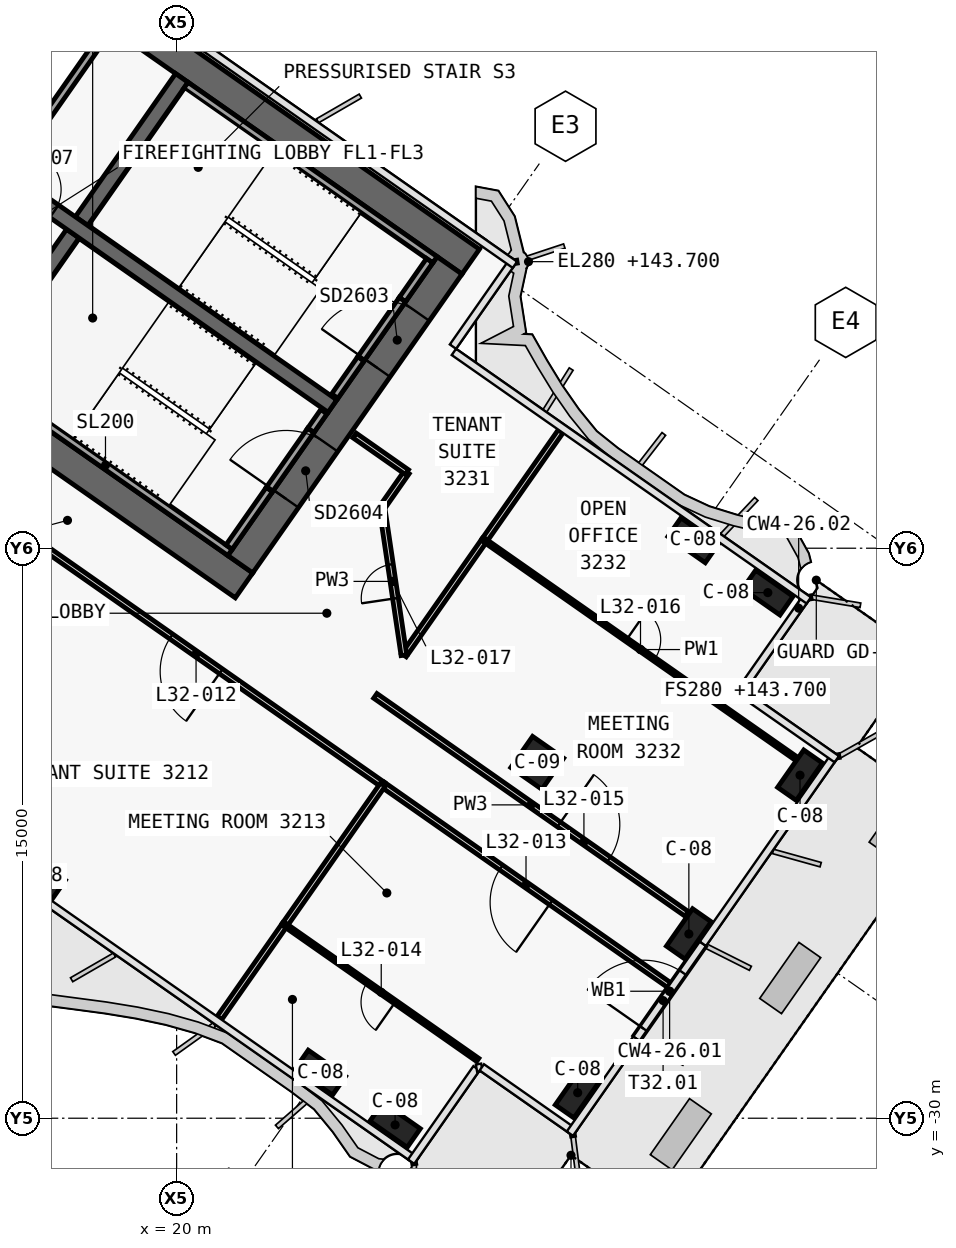
"""IFC4 building model, lengths in metres.
Left out: names, types, materials, properties, quantities, classifications, styles, units other than length and angle.
Written with IfcOpenShell. Run it as: python <this file> out.ifc"""

import sys

from ifc_helpers import new_model, si_unit, direction, frame, frame_2d, origin, origin_2d, place, context, subcontext, project, spatial, polyline, rectangle, outline, extrude, element, fill, save


model = new_model("IFC4")
c1 = context("Model", 3, precision=1e-05, world=origin(), true_north=direction((0.0, 1.0)))
c2 = subcontext(c1, "Body", "Model", "MODEL_VIEW")
j1 = project(units=[si_unit("LENGTHUNIT", "METRE"), si_unit("PLANEANGLEUNIT", "RADIAN")], contexts=[c1])
p1 = place(None, origin())
s1 = spatial("IfcSite", under=j1, at=p1, CompositionType="ELEMENT")
p2 = place(p1, origin())
s2 = spatial("IfcBuilding", under=s1, at=p2, CompositionType="ELEMENT")
p3 = place(p2, frame((0.0, 0.0, 143.7)))
s3 = spatial("IfcBuildingStorey", under=s2, at=p3, CompositionType="ELEMENT", Elevation=143.7)
p4 = place(p3, frame((-0.029, 11.984, 0.0), z_axis=(0.0, 0.0, 1.0), x_axis=(0.819151382952, -0.573577380837, 0.0)))
e1 = element("IfcWall", 1, at=p4, inside=s3, PredefinedType="SHEAR", context=c2, shape_type="SweptSolid", body=[
    extrude(outline(polyline([(33.898, 0.4), (-0.0, 0.4), (0.56, -0.4), (33.898, -0.4), (33.898, 0.4)])), origin(), (0.0, 0.0, 1.0), 3.9),
])
p5 = place(p3, frame((-0.029, -0.712, 0.0), z_axis=(0.0, 0.0, 1.0), x_axis=(0.819151758019, -0.573576845187, 0.0)))
e2 = element("IfcWall", 2, at=p5, inside=s3, PredefinedType="SHEAR", context=c2, shape_type="SweptSolid", body=[
    extrude(outline(polyline([(26.616, 0.4), (-0.0, 0.4), (0.56, -0.4), (26.616, -0.4), (26.616, 0.4)])), origin(), (0.0, 0.0, 1.0), 3.9),
])
p6 = place(p5, frame((6.666, 0.0, 0.0)))
e3 = element("IfcOpeningElement", 3, at=p6, cuts=e2, PredefinedType="OPENING", context=c2, shape_type="SweptSolid", body=[
    extrude(rectangle(XDim=1.5, YDim=2.1, at=frame_2d((0.75, 1.05))), frame((0.0, 0.41, 0.0), z_axis=(0.0, -1.0, 0.0), x_axis=(1.0, 0.0, 0.0)), (0.0, 0.0, 1.0), 0.82),
])
p7 = place(p5, frame((12.366, 0.0, 0.0)))
e4 = element("IfcOpeningElement", 4, at=p7, cuts=e2, PredefinedType="OPENING", context=c2, shape_type="SweptSolid", body=[
    extrude(rectangle(XDim=1.5, YDim=2.1, at=frame_2d((0.75, 1.05))), frame((0.0, 0.41, 0.0), z_axis=(0.0, -1.0, 0.0), x_axis=(1.0, 0.0, 0.0)), (0.0, 0.0, 1.0), 0.82),
])
p8 = place(p3, frame((21.675, -15.421, 0.0), z_axis=(0.0, 0.0, 1.0), x_axis=(0.573581815061, 0.819148278049, 0.0)))
e5 = element("IfcWall", 5, at=p8, inside=s3, PredefinedType="SHEAR", context=c2, shape_type="SweptSolid", body=[
    extrude(outline(polyline([(9.6, 0.4), (0.0, 0.4), (0.0, -0.4), (9.6, -0.4), (9.6, 0.4)])), origin(), (0.0, 0.0, 1.0), 3.9),
])
p9 = place(p8, frame((6.3, 0.0, 0.0)))
e6 = element("IfcOpeningElement", 6, at=p9, cuts=e5, PredefinedType="OPENING", context=c2, shape_type="SweptSolid", body=[
    extrude(rectangle(XDim=1.8, YDim=2.1, at=frame_2d((0.9, 1.05))), frame((0.0, 0.41, 0.0), z_axis=(0.0, -1.0, 0.0), x_axis=(1.0, 0.0, 0.0)), (0.0, 0.0, 1.0), 0.82),
])
p10 = place(p8, frame((2.1, 0.0, 0.0)))
e7 = element("IfcOpeningElement", 7, at=p10, cuts=e5, PredefinedType="OPENING", context=c2, shape_type="SweptSolid", body=[
    extrude(rectangle(XDim=1.8, YDim=2.1, at=frame_2d((0.9, 1.05))), frame((0.0, 0.41, 0.0), z_axis=(0.0, -1.0, 0.0), x_axis=(1.0, 0.0, 0.0)), (0.0, 0.0, 1.0), 0.82),
])
p11 = place(p3, frame((14.63, -10.488, 0.0), z_axis=(0.0, 0.0, 1.0), x_axis=(0.573611936273, 0.819127185829, 0.0)))
e8 = element("IfcWall", 8, at=p11, inside=s3, PredefinedType="SHEAR", context=c2, shape_type="SweptSolid", body=[
    extrude(outline(polyline([(0.0, 0.2), (0.0, -0.2), (4.6, -0.2), (4.6, 0.2), (0.0, 0.2)])), origin(), (0.0, 0.0, 1.0), 3.9),
])
p12 = place(p3, frame((17.498, -6.392, 0.0), z_axis=(0.0, 0.0, 1.0), x_axis=(0.573611936273, 0.819127185829, 0.0)))
e9 = element("IfcWall", 9, at=p12, inside=s3, PredefinedType="SHEAR", context=c2, shape_type="SweptSolid", body=[
    extrude(outline(polyline([(4.6, -0.2), (4.6, 0.2), (0.0, 0.2), (0.0, -0.2), (4.6, -0.2)])), origin(), (0.0, 0.0, 1.0), 3.9),
])
p13 = place(p3, frame((2.638, 3.768, 0.0), z_axis=(0.0, 0.0, 1.0), x_axis=(0.81915267502, -0.573575535572, 0.0)))
e10 = element("IfcWall", 10, at=p13, inside=s3, PredefinedType="SHEAR", context=c2, shape_type="SweptSolid", body=[
    extrude(outline(polyline([(0.0, 0.2), (0.0, -0.2), (26.2, -0.2), (26.2, 0.2), (0.0, 0.2)])), origin(), (0.0, 0.0, 1.0), 3.9),
])
p14 = place(p13, frame((9.637, 0.0, 0.0)))
e11 = element("IfcOpeningElement", 11, at=p14, cuts=e10, PredefinedType="OPENING", context=c2, shape_type="SweptSolid", body=[
    extrude(rectangle(XDim=1.2, YDim=2.1, at=frame_2d((0.6, 1.05))), frame((0.0, 0.21, 0.0), z_axis=(0.0, -1.0, 0.0), x_axis=(1.0, 0.0, 0.0)), (0.0, 0.0, 1.0), 0.42),
])
p15 = place(p13, frame((11.812, 0.0, 0.0)))
e12 = element("IfcOpeningElement", 12, at=p15, cuts=e10, PredefinedType="OPENING", context=c2, shape_type="SweptSolid", body=[
    extrude(rectangle(XDim=1.2, YDim=2.1, at=frame_2d((0.6, 1.05))), frame((0.0, 0.21, 0.0), z_axis=(0.0, -1.0, 0.0), x_axis=(1.0, 0.0, 0.0)), (0.0, 0.0, 1.0), 0.42),
])
p16 = place(p13, frame((13.988, 0.0, 0.0)))
e13 = element("IfcOpeningElement", 13, at=p16, cuts=e10, PredefinedType="OPENING", context=c2, shape_type="SweptSolid", body=[
    extrude(rectangle(XDim=1.2, YDim=2.1, at=frame_2d((0.6, 1.05))), frame((0.0, 0.21, 0.0), z_axis=(0.0, -1.0, 0.0), x_axis=(1.0, 0.0, 0.0)), (0.0, 0.0, 1.0), 0.42),
])
p17 = place(p13, frame((16.262, 0.0, 0.0)))
e14 = element("IfcOpeningElement", 14, at=p17, cuts=e10, PredefinedType="OPENING", context=c2, shape_type="SweptSolid", body=[
    extrude(rectangle(XDim=1.0, YDim=2.1, at=frame_2d((0.5, 1.05))), frame((0.0, 0.21, 0.0), z_axis=(0.0, -1.0, 0.0), x_axis=(1.0, 0.0, 0.0)), (0.0, 0.0, 1.0), 0.42),
])
for number, where, z_axis, x_axis in (
    (15, (16.41, -23.637, 0.0), (0.0, 0.0, 1.0), (0.819, -0.574, 0.0)),
    (16, (23.782, -28.799, 0.0), (0.0, 0.0, 1.0), (0.819, -0.574, 0.0)),
    (17, (25.748, -30.176, 0.0), (0.0, 0.0, 1.0), (0.819, -0.574, 0.0)),
    (18, (33.591, -14.792, 0.0), (0.0, 0.0, 1.0), (0.819, -0.574, 0.0)),
    (19, (35.556, -16.168, 0.0), (0.0, 0.0, 1.0), (0.819, -0.574, 0.0)),
    (20, (30.553, -29.329, 0.0), (0.0, 0.0, 1.0), (0.574, 0.819, 0.0)),
    (21, (33.479, -25.151, 0.0), (0.0, 0.0, 1.0), (0.574, 0.819, 0.0)),
    (22, (36.404, -20.973, 0.0), (0.0, 0.0, 1.0), (0.574, 0.819, 0.0)),
):
    element("IfcColumn", number, at=place(p3, frame(where, z_axis=z_axis, x_axis=x_axis)), inside=s3, PredefinedType="COLUMN", context=c2, shape_type="SweptSolid", body=[
        extrude(rectangle(XDim=1.2, YDim=0.6, at=origin_2d()), origin(), (0.0, 0.0, 1.0), 3.9),
    ])
p18 = place(p3, frame((29.49, -20.649, 0.0), z_axis=(0.0, 0.0, 1.0), x_axis=(0.819152044289, -0.573576436351, 0.0)))
e23 = element("IfcColumn", 23, at=p18, inside=s3, PredefinedType="COLUMN", context=c2, shape_type="SweptSolid", body=[
    extrude(rectangle(XDim=1.0, YDim=1.0, at=origin_2d()), origin(), (0.0, 0.0, 1.0), 3.9),
])
p19 = place(p3, frame((15.594, -5.059, 0.0), z_axis=(0.0, 0.0, 1.0), x_axis=(0.573540709186, 0.819177059558, 0.0)))
e24 = element("IfcWall", 24, at=p19, inside=s3, PredefinedType="SOLIDWALL", context=c2, shape_type="SweptSolid", body=[
    extrude(rectangle(XDim=4.6, YDim=0.2, at=frame_2d((2.3, 0.0))), origin(), (0.0, 0.0, 1.0), 3.9),
])
p20 = place(p3, frame((20.243, -2.821, 0.0), z_axis=(0.0, 0.0, 1.0), x_axis=(0.819141584393, -0.57359137434, 0.0)))
e25 = element("IfcWall", 25, at=p20, inside=s3, PredefinedType="SOLIDWALL", context=c2, shape_type="SweptSolid", body=[
    extrude(rectangle(XDim=8.0, YDim=0.2, at=frame_2d((4.0, 0.0))), origin(), (0.0, 0.0, 1.0), 3.62),
])
p21 = place(p3, frame((24.162, -10.998, 0.0), z_axis=(0.0, 0.0, 1.0), x_axis=(0.573612502218, 0.819126789514, 0.0)))
e26 = element("IfcWall", 26, at=p21, inside=s3, PredefinedType="SOLIDWALL", context=c2, shape_type="SweptSolid", body=[
    extrude(rectangle(XDim=1.2, YDim=0.2, at=frame_2d((0.6, 0.0))), origin(), (0.0, 0.0, 1.0), 3.62),
])
p22 = place(p3, frame((25.94, -8.458, 0.0), z_axis=(0.0, 0.0, 1.0), x_axis=(0.573619628835, 0.819121798889, 0.0)))
e27 = element("IfcWall", 27, at=p22, inside=s3, PredefinedType="SOLIDWALL", context=c2, shape_type="SweptSolid", body=[
    extrude(rectangle(XDim=1.25, YDim=0.2, at=frame_2d((0.625, 0.0))), origin(), (0.0, 0.0, 1.0), 3.62),
])
p23 = place(p3, frame((24.85, -10.014, 2.15), z_axis=(0.0, 0.0, 1.0), x_axis=(0.573505465124, 0.819201734296, 0.0)))
e28 = element("IfcWall", 28, at=p23, inside=s3, PredefinedType="SOLIDWALL", context=c2, shape_type="SweptSolid", body=[
    extrude(rectangle(XDim=1.9, YDim=0.2, at=frame_2d((0.95, 0.0))), origin(), (0.0, 0.0, 1.0), 1.47),
])
p24 = place(p3, frame((14.851, -10.521, 0.0), z_axis=(0.0, 0.0, 1.0), x_axis=(0.819141584393, -0.57359137434, 0.0)))
e29 = element("IfcWall", 29, at=p24, inside=s3, PredefinedType="SOLIDWALL", context=c2, shape_type="SweptSolid", body=[
    extrude(rectangle(XDim=8.0, YDim=0.2, at=frame_2d((4.0, 0.0))), origin(), (0.0, 0.0, 1.0), 3.62),
])
p25 = place(p3, frame((21.38, -14.97, 0.0), z_axis=(0.0, 0.0, 1.0), x_axis=(0.573559770908, 0.819163713305, 0.0)))
e30 = element("IfcWall", 30, at=p25, inside=s3, PredefinedType="SOLIDWALL", context=c2, shape_type="SweptSolid", body=[
    extrude(rectangle(XDim=1.85, YDim=0.2, at=frame_2d((0.925, 0.0))), origin(), (0.0, 0.0, 1.0), 3.62),
])
p26 = place(p3, frame((23.531, -11.898, 0.0), z_axis=(0.0, 0.0, 1.0), x_axis=(0.573708088123, 0.819059844958, 0.0)))
e31 = element("IfcWall", 31, at=p26, inside=s3, PredefinedType="SOLIDWALL", context=c2, shape_type="SweptSolid", body=[
    extrude(rectangle(XDim=0.6, YDim=0.2, at=frame_2d((0.3, 0.0))), origin(), (0.0, 0.0, 1.0), 3.62),
])
p27 = place(p3, frame((22.441, -13.455, 2.15), z_axis=(0.0, 0.0, 1.0), x_axis=(0.573591692345, 0.819141361715, 0.0)))
e32 = element("IfcWall", 32, at=p27, inside=s3, PredefinedType="SOLIDWALL", context=c2, shape_type="SweptSolid", body=[
    extrude(rectangle(XDim=1.9, YDim=0.2, at=frame_2d((0.95, 0.0))), origin(), (0.0, 0.0, 1.0), 1.47),
])
p28 = place(p3, frame((32.115, -27.883, 0.0), z_axis=(0.0, 0.0, 1.0), x_axis=(0.573511662293, 0.819197395756, 0.0)))
e33 = element("IfcWall", 33, at=p28, inside=s3, PredefinedType="SOLIDWALL", context=c2, shape_type="SweptSolid", body=[
    extrude(rectangle(XDim=2.99, YDim=0.2, at=frame_2d((1.495, 0.0))), origin(), (0.0, 0.0, 1.0), 3.62),
])
p29 = place(p28, frame((0.295, 0.0, 0.0)))
e34 = element("IfcOpeningElement", 34, at=p29, cuts=e33, PredefinedType="OPENING", context=c2, shape_type="SweptSolid", body=[
    extrude(rectangle(XDim=1.8, YDim=2.4, at=frame_2d((0.9, 1.2))), frame((0.0, 0.11, 0.0), z_axis=(0.0, -1.0, 0.0), x_axis=(1.0, 0.0, 0.0)), (0.0, 0.0, 1.0), 0.22),
])
p30 = place(p3, frame((25.228, -18.886, 0.0), z_axis=(0.0, 0.0, 1.0), x_axis=(0.819155080891, -0.573572099609, 0.0)))
e35 = element("IfcWall", 35, at=p30, inside=s3, PredefinedType="PARTITIONING", context=c2, shape_type="SweptSolid", body=[
    extrude(rectangle(XDim=10.002, YDim=0.15, at=frame_2d((5.001, 0.0))), origin(), (0.0, 0.0, 1.0), 3.0),
])
p31 = place(p30, frame((5.901, 0.0, 0.0)))
e36 = element("IfcOpeningElement", 36, at=p31, cuts=e35, PredefinedType="OPENING", context=c2, shape_type="SweptSolid", body=[
    extrude(rectangle(XDim=1.6, YDim=2.1, at=frame_2d((0.8, 1.05))), frame((0.0, 0.085, 0.0), z_axis=(0.0, -1.0, 0.0), x_axis=(1.0, 0.0, 0.0)), (0.0, 0.0, 1.0), 0.17),
])
p32 = place(p3, frame((25.427, -21.223, 0.0), z_axis=(0.0, 0.0, 1.0), x_axis=(-0.819147828287, 0.573582457378, 0.0)))
e37 = element("IfcWall", 37, at=p32, inside=s3, PredefinedType="PARTITIONING", context=c2, shape_type="SweptSolid", body=[
    extrude(rectangle(XDim=12.004, YDim=0.15, at=frame_2d((6.002, 0.0))), origin(), (0.0, 0.0, 1.0), 3.0),
])
p33 = place(p32, frame((5.202, 0.0, 0.0)))
e38 = element("IfcOpeningElement", 38, at=p33, cuts=e37, PredefinedType="OPENING", context=c2, shape_type="SweptSolid", body=[
    extrude(rectangle(XDim=1.6, YDim=2.1, at=frame_2d((0.8, 1.05))), frame((0.0, 0.085, 0.0), z_axis=(0.0, -1.0, 0.0), x_axis=(1.0, 0.0, 0.0)), (0.0, 0.0, 1.0), 0.17),
])
p34 = place(p3, frame((32.962, -26.499, 0.0), z_axis=(0.0, 0.0, 1.0), x_axis=(-0.81915089424, 0.573578078788, 0.0)))
e39 = element("IfcWall", 39, at=p34, inside=s3, PredefinedType="PARTITIONING", context=c2, shape_type="SweptSolid", body=[
    extrude(rectangle(XDim=9.202, YDim=0.15, at=frame_2d((4.601, 0.0))), origin(), (0.0, 0.0, 1.0), 2.9),
])
p35 = place(p34, frame((3.801, 0.0, 0.0)))
e40 = element("IfcOpeningElement", 40, at=p35, cuts=e39, PredefinedType="OPENING", context=c2, shape_type="SweptSolid", body=[
    extrude(rectangle(XDim=1.6, YDim=2.1, at=frame_2d((0.8, 1.05))), frame((0.0, 0.085, 0.0), z_axis=(0.0, -1.0, 0.0), x_axis=(1.0, 0.0, 0.0)), (0.0, 0.0, 1.0), 0.17),
])
p36 = place(p3, frame((30.105, -11.924, 0.0), z_axis=(0.0, 0.0, 1.0), x_axis=(-0.573560622794, -0.819163116834, 0.0)))
e41 = element("IfcWall", 41, at=p36, inside=s3, PredefinedType="PARTITIONING", context=c2, shape_type="SweptSolid", body=[
    extrude(rectangle(XDim=3.501, YDim=0.15, at=frame_2d((1.75, 0.0))), origin(), (0.0, 0.0, 1.0), 3.0),
])
p37 = place(p3, frame((28.099, -14.789, 0.0), z_axis=(0.0, 0.0, 1.0), x_axis=(-0.573577686589, -0.819151168862, 0.0)))
e42 = element("IfcWall", 42, at=p37, inside=s3, PredefinedType="PARTITIONING", context=c2, shape_type="SweptSolid", body=[
    extrude(rectangle(XDim=3.693, YDim=0.15, at=frame_2d((1.847, 0.0))), origin(), (0.0, 0.0, 1.0), 3.62),
])
p38 = place(p3, frame((25.98, -17.815, 0.0), z_axis=(0.0, 0.0, 1.0), x_axis=(-0.146956602865, 0.989142940567, 0.0)))
e43 = element("IfcWall", 43, at=p38, inside=s3, PredefinedType="PARTITIONING", context=c2, shape_type="SweptSolid", body=[
    extrude(rectangle(XDim=3.926, YDim=0.15, at=frame_2d((1.963, 0.0))), origin(), (0.0, 0.0, 1.0), 3.62),
])
p39 = place(p38, frame((1.513, 0.0, 0.0)))
e44 = element("IfcOpeningElement", 44, at=p39, cuts=e43, PredefinedType="OPENING", context=c2, shape_type="SweptSolid", body=[
    extrude(rectangle(XDim=0.9, YDim=2.1, at=frame_2d((0.45, 1.05))), frame((0.0, 0.085, 0.0), z_axis=(0.0, -1.0, 0.0), x_axis=(1.0, 0.0, 0.0)), (0.0, 0.0, 1.0), 0.17),
])
p40 = place(p3, frame((25.403, -13.932, 0.0), z_axis=(0.0, 0.0, 1.0), x_axis=(0.573462344363, 0.819231920519, 0.0)))
e45 = element("IfcWall", 45, at=p40, inside=s3, PredefinedType="PARTITIONING", context=c2, shape_type="SweptSolid", body=[
    extrude(rectangle(XDim=1.141, YDim=0.15, at=frame_2d((0.571, 0.0))), origin(), (0.0, 0.0, 1.0), 3.62),
])
p41 = place(p3, frame((26.058, -12.997, 0.0), z_axis=(0.0, 0.0, 1.0), x_axis=(-0.819109000826, 0.573637903879, 0.0)))
e46 = element("IfcWall", 46, at=p41, inside=s3, PredefinedType="PARTITIONING", context=c2, shape_type="SweptSolid", body=[
    extrude(rectangle(XDim=1.68, YDim=0.15, at=frame_2d((0.84, 0.0))), origin(), (0.0, 0.0, 1.0), 3.62),
])
p42 = place(p3, frame((28.098, -14.79, 0.0), z_axis=(0.0, 0.0, 1.0), x_axis=(0.819153008203, -0.573575059736, 0.0)))
e47 = element("IfcWall", 47, at=p42, inside=s3, PredefinedType="PARTITIONING", context=c2, shape_type="SweptSolid", body=[
    extrude(rectangle(XDim=10.03, YDim=0.1, at=frame_2d((5.015, 0.0))), origin(), (0.0, 0.0, 1.0), 2.9),
])
p43 = place(p42, frame((4.565, 0.0, 0.0)))
e48 = element("IfcOpeningElement", 48, at=p43, cuts=e47, PredefinedType="OPENING", context=c2, shape_type="SweptSolid", body=[
    extrude(rectangle(XDim=0.9, YDim=2.1, at=frame_2d((0.45, 1.05))), frame((0.0, 0.06, 0.0), z_axis=(0.0, -1.0, 0.0), x_axis=(1.0, 0.0, 0.0)), (0.0, 0.0, 1.0), 0.12),
])
p44 = place(p3, frame((22.845, -24.907, 0.0), z_axis=(0.0, 0.0, 1.0), x_axis=(-0.573555162214, -0.819166940189, 0.0)))
e49 = element("IfcWall", 49, at=p44, inside=s3, PredefinedType="PARTITIONING", context=c2, shape_type="SweptSolid", body=[
    extrude(rectangle(XDim=3.001, YDim=0.15, at=frame_2d((1.5, 0.0))), origin(), (0.0, 0.0, 1.0), 2.9),
])
p45 = place(p3, frame((25.426, -21.222, 0.0), z_axis=(0.0, 0.0, 1.0), x_axis=(-0.573589723117, -0.819142740634, 0.0)))
e50 = element("IfcWall", 50, at=p45, inside=s3, PredefinedType="PARTITIONING", context=c2, shape_type="SweptSolid", body=[
    extrude(rectangle(XDim=4.502, YDim=0.15, at=frame_2d((2.251, 0.0))), origin(), (0.0, 0.0, 1.0), 3.62),
])
p46 = place(p3, frame((27.923, -28.465, 0.0), z_axis=(0.0, 0.0, 1.0), x_axis=(-0.819159766912, 0.573565407145, 0.0)))
e51 = element("IfcWall", 51, at=p46, inside=s3, PredefinedType="PARTITIONING", context=c2, shape_type="SweptSolid", body=[
    extrude(rectangle(XDim=6.2, YDim=0.1, at=frame_2d((3.1, 0.0))), origin(), (0.0, 0.0, 1.0), 3.0),
])
p47 = place(p46, frame((2.65, 0.0, 0.0)))
e52 = element("IfcOpeningElement", 52, at=p47, cuts=e51, PredefinedType="OPENING", context=c2, shape_type="SweptSolid", body=[
    extrude(rectangle(XDim=0.9, YDim=2.1, at=frame_2d((0.45, 1.05))), frame((0.0, 0.06, 0.0), z_axis=(0.0, -1.0, 0.0), x_axis=(1.0, 0.0, 0.0)), (0.0, 0.0, 1.0), 0.12),
])
p48 = place(p17, origin())
e53 = element("IfcDoor", 53, at=p48, inside=s3, OperationType="SINGLE_SWING_RIGHT", PredefinedType="DOOR", context=c2, shape_type="SweptSolid", body=[
    extrude(rectangle(XDim=1.0, YDim=2.1, at=frame_2d((0.5, 1.05))), frame((0.0, 0.025, 0.0), z_axis=(0.0, -1.0, 0.0), x_axis=(1.0, 0.0, 0.0)), (0.0, 0.0, 1.0), 0.05),
])
fill(e14, e53)
p49 = place(p9, origin())
e54 = element("IfcDoor", 54, at=p49, inside=s3, OperationType="DOUBLE_DOOR_SINGLE_SWING", PredefinedType="DOOR", context=c2, shape_type="SweptSolid", body=[
    extrude(rectangle(XDim=1.8, YDim=2.1, at=frame_2d((0.9, 1.05))), frame((0.0, 0.025, 0.0), z_axis=(0.0, -1.0, 0.0), x_axis=(1.0, 0.0, 0.0)), (0.0, 0.0, 1.0), 0.05),
])
fill(e6, e54)
p50 = place(p10, origin())
e55 = element("IfcDoor", 55, at=p50, inside=s3, OperationType="DOUBLE_DOOR_SINGLE_SWING", PredefinedType="DOOR", context=c2, shape_type="SweptSolid", body=[
    extrude(rectangle(XDim=1.8, YDim=2.1, at=frame_2d((0.9, 1.05))), frame((0.0, 0.025, 0.0), z_axis=(0.0, -1.0, 0.0), x_axis=(1.0, 0.0, 0.0)), (0.0, 0.0, 1.0), 0.05),
])
fill(e7, e55)
p51 = place(p29, origin())
e56 = element("IfcDoor", 56, at=p51, inside=s3, OperationType="DOUBLE_DOOR_DOUBLE_SWING", PredefinedType="DOOR", context=c2, shape_type="SweptSolid", body=[
    extrude(rectangle(XDim=1.8, YDim=2.4, at=frame_2d((0.9, 1.2))), frame((0.0, 0.025, 0.0), z_axis=(0.0, -1.0, 0.0), x_axis=(1.0, 0.0, 0.0)), (0.0, 0.0, 1.0), 0.05),
])
fill(e34, e56)
p52 = place(p33, origin())
e57 = element("IfcDoor", 57, at=p52, inside=s3, OperationType="DOUBLE_DOOR_SINGLE_SWING", PredefinedType="DOOR", context=c2, shape_type="SweptSolid", body=[
    extrude(rectangle(XDim=1.6, YDim=2.1, at=frame_2d((0.8, 1.05))), frame((0.0, 0.025, 0.0), z_axis=(0.0, -1.0, 0.0), x_axis=(1.0, 0.0, 0.0)), (0.0, 0.0, 1.0), 0.05),
])
fill(e38, e57)
p53 = place(p35, origin())
e58 = element("IfcDoor", 58, at=p53, inside=s3, OperationType="DOUBLE_DOOR_SINGLE_SWING", PredefinedType="DOOR", context=c2, shape_type="SweptSolid", body=[
    extrude(rectangle(XDim=1.6, YDim=2.1, at=frame_2d((0.8, 1.05))), frame((0.0, 0.025, 0.0), z_axis=(0.0, -1.0, 0.0), x_axis=(1.0, 0.0, 0.0)), (0.0, 0.0, 1.0), 0.05),
])
fill(e40, e58)
p54 = place(p47, origin())
e59 = element("IfcDoor", 59, at=p54, inside=s3, OperationType="SINGLE_SWING_LEFT", PredefinedType="DOOR", context=c2, shape_type="SweptSolid", body=[
    extrude(rectangle(XDim=0.9, YDim=2.1, at=frame_2d((0.45, 1.05))), frame((0.0, 0.025, 0.0), z_axis=(0.0, -1.0, 0.0), x_axis=(1.0, 0.0, 0.0)), (0.0, 0.0, 1.0), 0.05),
])
fill(e52, e59)
p55 = place(p31, origin())
e60 = element("IfcDoor", 60, at=p55, inside=s3, OperationType="DOUBLE_DOOR_SINGLE_SWING", PredefinedType="DOOR", context=c2, shape_type="SweptSolid", body=[
    extrude(rectangle(XDim=1.6, YDim=2.1, at=frame_2d((0.8, 1.05))), frame((0.0, 0.025, 0.0), z_axis=(0.0, -1.0, 0.0), x_axis=(1.0, 0.0, 0.0)), (0.0, 0.0, 1.0), 0.05),
])
fill(e36, e60)
p56 = place(p43, origin())
e61 = element("IfcDoor", 61, at=p56, inside=s3, OperationType="SINGLE_SWING_RIGHT", PredefinedType="DOOR", context=c2, shape_type="SweptSolid", body=[
    extrude(rectangle(XDim=0.9, YDim=2.1, at=frame_2d((0.45, 1.05))), frame((0.0, 0.025, 0.0), z_axis=(0.0, -1.0, 0.0), x_axis=(1.0, 0.0, 0.0)), (0.0, 0.0, 1.0), 0.05),
])
fill(e48, e61)
p57 = place(p39, origin())
e62 = element("IfcDoor", 62, at=p57, inside=s3, OperationType="SINGLE_SWING_LEFT", PredefinedType="DOOR", context=c2, shape_type="SweptSolid", body=[
    extrude(rectangle(XDim=0.9, YDim=2.1, at=frame_2d((0.45, 1.05))), frame((0.0, 0.025, 0.0), z_axis=(0.0, -1.0, 0.0), x_axis=(1.0, 0.0, 0.0)), (0.0, 0.0, 1.0), 0.05),
])
fill(e44, e62)
save(model, sys.argv[1])
